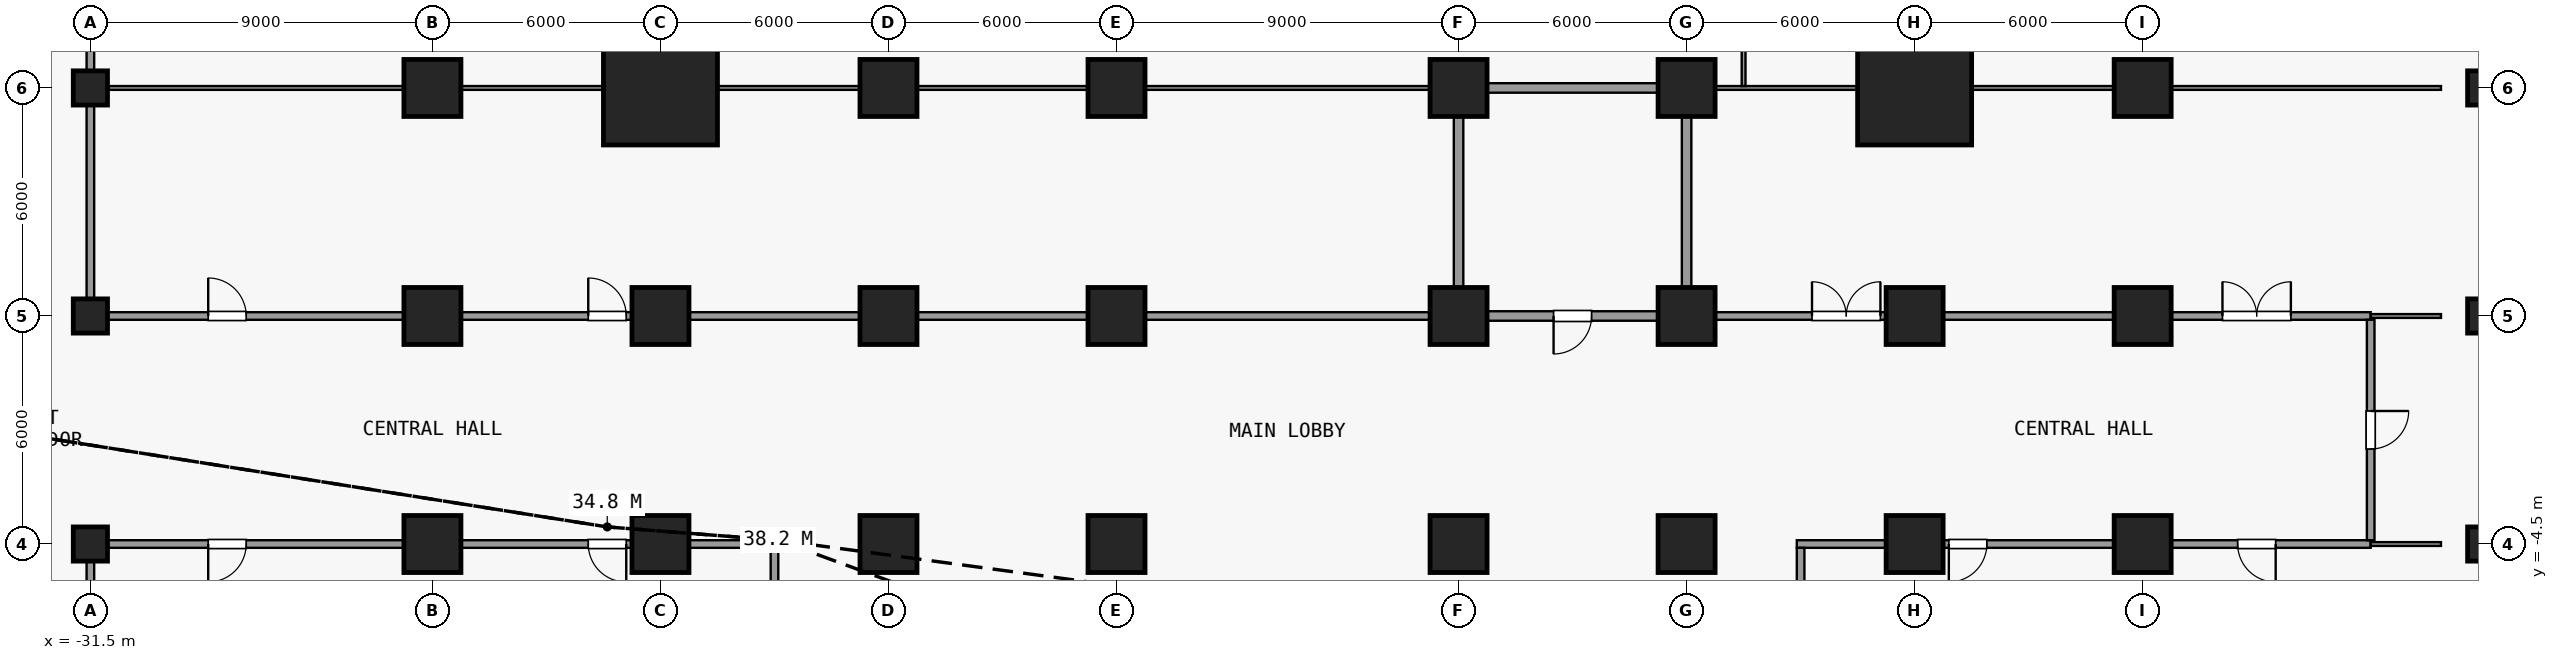
"""IFC4 building model, lengths in metres.
Left out: names, types, materials, properties, quantities, classifications, styles, units other than length and angle.
Written with IfcOpenShell. Run it as: python <this file> out.ifc"""

import sys

from ifc_helpers import new_model, si_unit, direction, frame, frame_2d, origin, origin_2d, place, context, subcontext, project, spatial, rectangle, extrude, element, fill, save


model = new_model("IFC4")
c1 = context("Model", 3, precision=1e-05, world=origin(), true_north=direction((0.0, 1.0)))
c2 = subcontext(c1, "Body", "Model", "MODEL_VIEW")
j1 = project(units=[si_unit("LENGTHUNIT", "METRE"), si_unit("PLANEANGLEUNIT", "RADIAN")], contexts=[c1])
p1 = place(None, origin())
s1 = spatial("IfcSite", under=j1, at=p1, CompositionType="ELEMENT")
p2 = place(p1, origin())
s2 = spatial("IfcBuilding", under=s1, at=p2, CompositionType="ELEMENT")
p3 = place(p2, origin())
s3 = spatial("IfcBuildingStorey", under=s2, at=p3, CompositionType="ELEMENT", Elevation=0.0)
for number, where, z_axis, x_axis in (
    (1, (-31.5, -4.5, 0.0), (0.0, 0.0, 1.0), (1.0, 0.0, 0.0)),
    (2, (-31.5, 1.5, 0.0), (0.0, 0.0, 1.0), (1.0, 0.0, 0.0)),
    (3, (-31.5, 7.5, 0.0), (0.0, 0.0, 1.0), (1.0, 0.0, 0.0)),
):
    element("IfcColumn", number, at=place(p3, frame(where, z_axis=z_axis, x_axis=x_axis)), inside=s3, PredefinedType="COLUMN", context=c2, shape_type="SweptSolid", body=[
        extrude(rectangle(XDim=0.9, YDim=0.9, at=origin_2d()), origin(), (0.0, 0.0, 1.0), 8.0),
    ])
for number, where, z_axis, x_axis in (
    (4, (-22.5, -4.5, 0.0), (0.0, 0.0, 1.0), (1.0, 0.0, 0.0)),
    (5, (-22.5, 1.5, 0.0), (0.0, 0.0, 1.0), (1.0, 0.0, 0.0)),
    (6, (-22.5, 7.5, 0.0), (0.0, 0.0, 1.0), (1.0, 0.0, 0.0)),
    (7, (-16.5, -4.5, 0.0), (0.0, 0.0, 1.0), (1.0, 0.0, 0.0)),
    (8, (-16.5, 1.5, 0.0), (0.0, 0.0, 1.0), (1.0, 0.0, 0.0)),
):
    element("IfcColumn", number, at=place(p3, frame(where, z_axis=z_axis, x_axis=x_axis)), inside=s3, PredefinedType="COLUMN", context=c2, shape_type="SweptSolid", body=[
        extrude(rectangle(XDim=1.5, YDim=1.5, at=origin_2d()), origin(), (0.0, 0.0, 1.0), 8.0),
    ])
p4 = place(p3, frame((-16.5, 7.5, 0.0), z_axis=(0.0, 0.0, 1.0), x_axis=(1.0, 0.0, 0.0)))
e9 = element("IfcColumn", 9, at=p4, inside=s3, PredefinedType="COLUMN", context=c2, shape_type="SweptSolid", body=[
    extrude(rectangle(XDim=3.0, YDim=3.0, at=origin_2d()), origin(), (0.0, 0.0, 1.0), 8.0),
])
for number, where, z_axis, x_axis in (
    (10, (-10.5, -4.5, 0.0), (0.0, 0.0, 1.0), (1.0, 0.0, 0.0)),
    (11, (-10.5, 1.5, 0.0), (0.0, 0.0, 1.0), (1.0, 0.0, 0.0)),
    (12, (-10.5, 7.5, 0.0), (0.0, 0.0, 1.0), (1.0, 0.0, 0.0)),
    (13, (-4.5, -4.5, 0.0), (0.0, 0.0, 1.0), (1.0, 0.0, 0.0)),
    (14, (-4.5, 1.5, 0.0), (0.0, 0.0, 1.0), (1.0, 0.0, 0.0)),
    (15, (-4.5, 7.5, 0.0), (0.0, 0.0, 1.0), (1.0, 0.0, 0.0)),
    (16, (4.5, -4.5, 0.0), (0.0, 0.0, 1.0), (1.0, 0.0, 0.0)),
    (17, (4.5, 1.5, 0.0), (0.0, 0.0, 1.0), (1.0, 0.0, 0.0)),
    (18, (4.5, 7.5, 0.0), (0.0, 0.0, 1.0), (1.0, 0.0, 0.0)),
    (19, (10.5, -4.5, 0.0), (0.0, 0.0, 1.0), (1.0, 0.0, 0.0)),
    (20, (10.5, 1.5, 0.0), (0.0, 0.0, 1.0), (1.0, 0.0, 0.0)),
    (21, (10.5, 7.5, 0.0), (0.0, 0.0, 1.0), (1.0, 0.0, 0.0)),
    (22, (16.5, -4.5, 0.0), (0.0, 0.0, 1.0), (1.0, 0.0, 0.0)),
    (23, (16.5, 1.5, 0.0), (0.0, 0.0, 1.0), (1.0, 0.0, 0.0)),
):
    element("IfcColumn", number, at=place(p3, frame(where, z_axis=z_axis, x_axis=x_axis)), inside=s3, PredefinedType="COLUMN", context=c2, shape_type="SweptSolid", body=[
        extrude(rectangle(XDim=1.5, YDim=1.5, at=origin_2d()), origin(), (0.0, 0.0, 1.0), 8.0),
    ])
p5 = place(p3, frame((16.5, 7.5, 0.0), z_axis=(0.0, 0.0, 1.0), x_axis=(1.0, 0.0, 0.0)))
e24 = element("IfcColumn", 24, at=p5, inside=s3, PredefinedType="COLUMN", context=c2, shape_type="SweptSolid", body=[
    extrude(rectangle(XDim=3.0, YDim=3.0, at=origin_2d()), origin(), (0.0, 0.0, 1.0), 8.0),
])
for number, where, z_axis, x_axis in (
    (25, (22.5, -4.5, 0.0), (0.0, 0.0, 1.0), (1.0, 0.0, 0.0)),
    (26, (22.5, 1.5, 0.0), (0.0, 0.0, 1.0), (1.0, 0.0, 0.0)),
    (27, (22.5, 7.5, 0.0), (0.0, 0.0, 1.0), (1.0, 0.0, 0.0)),
):
    element("IfcColumn", number, at=place(p3, frame(where, z_axis=z_axis, x_axis=x_axis)), inside=s3, PredefinedType="COLUMN", context=c2, shape_type="SweptSolid", body=[
        extrude(rectangle(XDim=1.5, YDim=1.5, at=origin_2d()), origin(), (0.0, 0.0, 1.0), 8.0),
    ])
for number, where, z_axis, x_axis in (
    (28, (31.5, -4.5, 0.0), (0.0, 0.0, 1.0), (1.0, 0.0, 0.0)),
    (29, (31.5, 1.5, 0.0), (0.0, 0.0, 1.0), (1.0, 0.0, 0.0)),
    (30, (31.5, 7.5, 0.0), (0.0, 0.0, 1.0), (1.0, 0.0, 0.0)),
):
    element("IfcColumn", number, at=place(p3, frame(where, z_axis=z_axis, x_axis=x_axis)), inside=s3, PredefinedType="COLUMN", context=c2, shape_type="SweptSolid", body=[
        extrude(rectangle(XDim=0.9, YDim=0.9, at=origin_2d()), origin(), (0.0, 0.0, 1.0), 8.0),
    ])
p6 = place(p3, frame((-31.6, -4.5, 0.0), z_axis=(0.0, 0.0, 1.0), x_axis=(1.0, 0.0, 0.0)))
e31 = element("IfcWall", 31, at=p6, inside=s3, PredefinedType="PARTITIONING", context=c2, shape_type="SweptSolid", body=[
    extrude(rectangle(XDim=18.2, YDim=0.2, at=frame_2d((9.1, 0.0))), origin(), (0.0, 0.0, 1.0), 7.65),
])
p7 = place(p6, frame((3.2, 0.0, 0.0)))
e32 = element("IfcOpeningElement", 32, at=p7, cuts=e31, PredefinedType="OPENING", context=c2, shape_type="SweptSolid", body=[
    extrude(rectangle(XDim=1.0, YDim=2.1, at=frame_2d((0.5, 1.05))), frame((0.0, 0.11, 0.0), z_axis=(0.0, -1.0, 0.0), x_axis=(1.0, 0.0, 0.0)), (0.0, 0.0, 1.0), 0.22),
])
p8 = place(p6, frame((13.2, 0.0, 0.0)))
e33 = element("IfcOpeningElement", 33, at=p8, cuts=e31, PredefinedType="OPENING", context=c2, shape_type="SweptSolid", body=[
    extrude(rectangle(XDim=1.0, YDim=2.1, at=frame_2d((0.5, 1.05))), frame((0.0, 0.11, 0.0), z_axis=(0.0, -1.0, 0.0), x_axis=(1.0, 0.0, 0.0)), (0.0, 0.0, 1.0), 0.22),
])
p9 = place(p3, frame((13.4, -4.5, 0.0), z_axis=(0.0, 0.0, 1.0), x_axis=(1.0, 0.0, 0.0)))
e34 = element("IfcWall", 34, at=p9, inside=s3, PredefinedType="PARTITIONING", context=c2, shape_type="SweptSolid", body=[
    extrude(rectangle(XDim=15.1, YDim=0.2, at=frame_2d((7.55, 0.0))), origin(), (0.0, 0.0, 1.0), 7.65),
])
p10 = place(p9, frame((4.0, 0.0, 0.0)))
e35 = element("IfcOpeningElement", 35, at=p10, cuts=e34, PredefinedType="OPENING", context=c2, shape_type="SweptSolid", body=[
    extrude(rectangle(XDim=1.0, YDim=2.1, at=frame_2d((0.5, 1.05))), frame((0.0, 0.11, 0.0), z_axis=(0.0, -1.0, 0.0), x_axis=(1.0, 0.0, 0.0)), (0.0, 0.0, 1.0), 0.22),
])
p11 = place(p9, frame((11.6, 0.0, 0.0)))
e36 = element("IfcOpeningElement", 36, at=p11, cuts=e34, PredefinedType="OPENING", context=c2, shape_type="SweptSolid", body=[
    extrude(rectangle(XDim=1.0, YDim=2.1, at=frame_2d((0.5, 1.05))), frame((0.0, 0.11, 0.0), z_axis=(0.0, -1.0, 0.0), x_axis=(1.0, 0.0, 0.0)), (0.0, 0.0, 1.0), 0.22),
])
p12 = place(p3, frame((28.5, -4.5, 0.0), z_axis=(0.0, 0.0, 1.0), x_axis=(1.0, 0.0, 0.0)))
e37 = element("IfcWall", 37, at=p12, inside=s3, PredefinedType="PARTITIONING", context=c2, shape_type="SweptSolid", body=[
    extrude(rectangle(XDim=1.85, YDim=0.1, at=frame_2d((0.925, 0.0))), origin(), (0.0, 0.0, 1.0), 7.65),
])
p13 = place(p3, frame((-31.6, 1.5, 0.0), z_axis=(0.0, 0.0, 1.0), x_axis=(1.0, 0.0, 0.0)))
e38 = element("IfcWall", 38, at=p13, inside=s3, PredefinedType="PARTITIONING", context=c2, shape_type="SweptSolid", body=[
    extrude(rectangle(XDim=36.1, YDim=0.2, at=frame_2d((18.05, 0.0))), origin(), (0.0, 0.0, 1.0), 7.65),
])
p14 = place(p13, frame((3.2, 0.0, 0.0)))
e39 = element("IfcOpeningElement", 39, at=p14, cuts=e38, PredefinedType="OPENING", context=c2, shape_type="SweptSolid", body=[
    extrude(rectangle(XDim=1.0, YDim=2.1, at=frame_2d((0.5, 1.05))), frame((0.0, 0.11, 0.0), z_axis=(0.0, -1.0, 0.0), x_axis=(1.0, 0.0, 0.0)), (0.0, 0.0, 1.0), 0.22),
])
p15 = place(p13, frame((13.2, 0.0, 0.0)))
e40 = element("IfcOpeningElement", 40, at=p15, cuts=e38, PredefinedType="OPENING", context=c2, shape_type="SweptSolid", body=[
    extrude(rectangle(XDim=1.0, YDim=2.1, at=frame_2d((0.5, 1.05))), frame((0.0, 0.11, 0.0), z_axis=(0.0, -1.0, 0.0), x_axis=(1.0, 0.0, 0.0)), (0.0, 0.0, 1.0), 0.22),
])
p16 = place(p3, frame((10.5, 1.5, 0.0), z_axis=(0.0, 0.0, 1.0), x_axis=(1.0, 0.0, 0.0)))
e41 = element("IfcWall", 41, at=p16, inside=s3, PredefinedType="PARTITIONING", context=c2, shape_type="SweptSolid", body=[
    extrude(rectangle(XDim=18.0, YDim=0.2, at=frame_2d((9.0, 0.0))), origin(), (0.0, 0.0, 1.0), 7.65),
])
p17 = place(p16, frame((3.3, 0.0, 0.0)))
e42 = element("IfcOpeningElement", 42, at=p17, cuts=e41, PredefinedType="OPENING", context=c2, shape_type="SweptSolid", body=[
    extrude(rectangle(XDim=1.8, YDim=2.1, at=frame_2d((0.9, 1.05))), frame((0.0, 0.11, 0.0), z_axis=(0.0, -1.0, 0.0), x_axis=(1.0, 0.0, 0.0)), (0.0, 0.0, 1.0), 0.22),
])
p18 = place(p16, frame((14.1, 0.0, 0.0)))
e43 = element("IfcOpeningElement", 43, at=p18, cuts=e41, PredefinedType="OPENING", context=c2, shape_type="SweptSolid", body=[
    extrude(rectangle(XDim=1.8, YDim=2.1, at=frame_2d((0.9, 1.05))), frame((0.0, 0.11, 0.0), z_axis=(0.0, -1.0, 0.0), x_axis=(1.0, 0.0, 0.0)), (0.0, 0.0, 1.0), 0.22),
])
p19 = place(p3, frame((28.5, 1.5, 0.0), z_axis=(0.0, 0.0, 1.0), x_axis=(1.0, 0.0, 0.0)))
e44 = element("IfcWall", 44, at=p19, inside=s3, PredefinedType="PARTITIONING", context=c2, shape_type="SweptSolid", body=[
    extrude(rectangle(XDim=1.85, YDim=0.1, at=frame_2d((0.925, 0.0))), origin(), (0.0, 0.0, 1.0), 7.65),
])
p20 = place(p3, frame((4.5, 1.5, 0.0), z_axis=(0.0, 0.0, 1.0), x_axis=(1.0, 0.0, 0.0)))
e45 = element("IfcWall", 45, at=p20, inside=s3, PredefinedType="PARTITIONING", context=c2, shape_type="SweptSolid", body=[
    extrude(rectangle(XDim=6.0, YDim=0.25, at=frame_2d((3.0, 0.0))), origin(), (0.0, 0.0, 1.0), 7.65),
])
p21 = place(p20, frame((2.5, 0.0, 0.0)))
e46 = element("IfcOpeningElement", 46, at=p21, cuts=e45, PredefinedType="OPENING", context=c2, shape_type="SweptSolid", body=[
    extrude(rectangle(XDim=1.0, YDim=2.1, at=frame_2d((0.5, 1.05))), frame((0.0, 0.135, 0.0), z_axis=(0.0, -1.0, 0.0), x_axis=(1.0, 0.0, 0.0)), (0.0, 0.0, 1.0), 0.27),
])
p22 = place(p3, frame((-31.4, 7.5, 0.0), z_axis=(0.0, 0.0, 1.0), x_axis=(1.0, 0.0, 0.0)))
e47 = element("IfcWall", 47, at=p22, inside=s3, PredefinedType="PARTITIONING", context=c2, shape_type="SweptSolid", body=[
    extrude(rectangle(XDim=35.9, YDim=0.1, at=frame_2d((17.95, 0.0))), origin(), (0.0, 0.0, 1.0), 7.65),
])
p23 = place(p3, frame((10.5, 7.5, 0.0), z_axis=(0.0, 0.0, 1.0), x_axis=(1.0, 0.0, 0.0)))
e48 = element("IfcWall", 48, at=p23, inside=s3, PredefinedType="PARTITIONING", context=c2, shape_type="SweptSolid", body=[
    extrude(rectangle(XDim=19.85, YDim=0.1, at=frame_2d((9.925, 0.0))), origin(), (0.0, 0.0, 1.0), 7.65),
])
p24 = place(p3, frame((4.5, 7.5, 0.0), z_axis=(0.0, 0.0, 1.0), x_axis=(1.0, 0.0, 0.0)))
e49 = element("IfcWall", 49, at=p24, inside=s3, PredefinedType="PARTITIONING", context=c2, shape_type="SweptSolid", body=[
    extrude(rectangle(XDim=6.0, YDim=0.25, at=frame_2d((3.0, 0.0))), origin(), (0.0, 0.0, 1.0), 7.65),
])
p25 = place(p3, frame((-31.5, -19.4, 0.0), z_axis=(0.0, 0.0, 1.0), x_axis=(0.0, 1.0, 0.0)))
e50 = element("IfcWall", 50, at=p25, inside=s3, PredefinedType="PARTITIONING", context=c2, shape_type="SweptSolid", body=[
    extrude(rectangle(XDim=14.8, YDim=0.2, at=frame_2d((7.4, 0.0))), origin(), (0.0, 0.0, 1.0), 7.65),
])
p26 = place(p3, frame((-31.5, 1.6, 0.0), z_axis=(0.0, 0.0, 1.0), x_axis=(0.0, 1.0, 0.0)))
e51 = element("IfcWall", 51, at=p26, inside=s3, PredefinedType="PARTITIONING", context=c2, shape_type="SweptSolid", body=[
    extrude(rectangle(XDim=11.8, YDim=0.2, at=frame_2d((5.9, 0.0))), origin(), (0.0, 0.0, 1.0), 7.65),
])
p27 = place(p3, frame((-13.5, -7.9, 0.0), z_axis=(0.0, 0.0, 1.0), x_axis=(0.0, 1.0, 0.0)))
e52 = element("IfcWall", 52, at=p27, inside=s3, PredefinedType="PARTITIONING", context=c2, shape_type="SweptSolid", body=[
    extrude(rectangle(XDim=3.3, YDim=0.2, at=frame_2d((1.65, 0.0))), origin(), (0.0, 0.0, 1.0), 7.65),
])
for number, where, z_axis, x_axis in (
    (53, (4.5, 1.625, 0.0), (0.0, 0.0, 1.0), (0.0, 1.0, 0.0)),
    (54, (10.5, 1.625, 0.0), (0.0, 0.0, 1.0), (0.0, 1.0, 0.0)),
):
    element("IfcWall", number, at=place(p3, frame(where, z_axis=z_axis, x_axis=x_axis)), inside=s3, PredefinedType="PARTITIONING", context=c2, shape_type="SweptSolid", body=[
        extrude(rectangle(XDim=5.75, YDim=0.25, at=frame_2d((2.875, 0.0))), origin(), (0.0, 0.0, 1.0), 7.65),
    ])
p28 = place(p3, frame((12.0, 7.55, 0.0), z_axis=(0.0, 0.0, 1.0), x_axis=(0.0, 1.0, 0.0)))
e55 = element("IfcWall", 55, at=p28, inside=s3, PredefinedType="PARTITIONING", context=c2, shape_type="SweptSolid", body=[
    extrude(rectangle(XDim=5.85, YDim=0.1, at=frame_2d((2.925, 0.0))), origin(), (0.0, 0.0, 1.0), 7.65),
])
p29 = place(p3, frame((13.5, -5.6, 0.0), z_axis=(0.0, 0.0, 1.0), x_axis=(0.0, 1.0, 0.0)))
e56 = element("IfcWall", 56, at=p29, inside=s3, PredefinedType="PARTITIONING", context=c2, shape_type="SweptSolid", body=[
    extrude(rectangle(XDim=1.0, YDim=0.2, at=frame_2d((0.5, 0.0))), origin(), (0.0, 0.0, 1.0), 7.65),
])
p30 = place(p3, frame((28.5, -4.4, 0.0), z_axis=(0.0, 0.0, 1.0), x_axis=(0.0, 1.0, 0.0)))
e57 = element("IfcWall", 57, at=p30, inside=s3, PredefinedType="PARTITIONING", context=c2, shape_type="SweptSolid", body=[
    extrude(rectangle(XDim=5.8, YDim=0.2, at=frame_2d((2.9, 0.0))), origin(), (0.0, 0.0, 1.0), 7.65),
])
p31 = place(p30, frame((2.4, 0.0, 0.0)))
e58 = element("IfcOpeningElement", 58, at=p31, cuts=e57, PredefinedType="OPENING", context=c2, shape_type="SweptSolid", body=[
    extrude(rectangle(XDim=1.0, YDim=2.1, at=frame_2d((0.5, 1.05))), frame((0.0, 0.11, 0.0), z_axis=(0.0, -1.0, 0.0), x_axis=(1.0, 0.0, 0.0)), (0.0, 0.0, 1.0), 0.22),
])
p32 = place(p7, origin())
e59 = element("IfcDoor", 59, at=p32, inside=s3, OperationType="SINGLE_SWING_LEFT", PredefinedType="DOOR", context=c2, shape_type="SweptSolid", body=[
    extrude(rectangle(XDim=1.0, YDim=2.1, at=frame_2d((0.5, 1.05))), frame((0.0, 0.025, 0.0), z_axis=(0.0, -1.0, 0.0), x_axis=(1.0, 0.0, 0.0)), (0.0, 0.0, 1.0), 0.05),
])
fill(e32, e59)
p33 = place(p8, origin())
e60 = element("IfcDoor", 60, at=p33, inside=s3, OperationType="SINGLE_SWING_RIGHT", PredefinedType="DOOR", context=c2, shape_type="SweptSolid", body=[
    extrude(rectangle(XDim=1.0, YDim=2.1, at=frame_2d((0.5, 1.05))), frame((0.0, 0.025, 0.0), z_axis=(0.0, -1.0, 0.0), x_axis=(1.0, 0.0, 0.0)), (0.0, 0.0, 1.0), 0.05),
])
fill(e33, e60)
p34 = place(p10, origin())
e61 = element("IfcDoor", 61, at=p34, inside=s3, OperationType="SINGLE_SWING_LEFT", PredefinedType="DOOR", context=c2, shape_type="SweptSolid", body=[
    extrude(rectangle(XDim=1.0, YDim=2.1, at=frame_2d((0.5, 1.05))), frame((0.0, 0.025, 0.0), z_axis=(0.0, -1.0, 0.0), x_axis=(1.0, 0.0, 0.0)), (0.0, 0.0, 1.0), 0.05),
])
fill(e35, e61)
p35 = place(p11, origin())
e62 = element("IfcDoor", 62, at=p35, inside=s3, OperationType="SINGLE_SWING_RIGHT", PredefinedType="DOOR", context=c2, shape_type="SweptSolid", body=[
    extrude(rectangle(XDim=1.0, YDim=2.1, at=frame_2d((0.5, 1.05))), frame((0.0, 0.025, 0.0), z_axis=(0.0, -1.0, 0.0), x_axis=(1.0, 0.0, 0.0)), (0.0, 0.0, 1.0), 0.05),
])
fill(e36, e62)
p36 = place(p14, origin())
e63 = element("IfcDoor", 63, at=p36, inside=s3, OperationType="SINGLE_SWING_RIGHT", PredefinedType="DOOR", context=c2, shape_type="SweptSolid", body=[
    extrude(rectangle(XDim=1.0, YDim=2.1, at=frame_2d((0.5, 1.05))), frame((0.0, 0.025, 0.0), z_axis=(0.0, -1.0, 0.0), x_axis=(1.0, 0.0, 0.0)), (0.0, 0.0, 1.0), 0.05),
])
fill(e39, e63)
p37 = place(p15, origin())
e64 = element("IfcDoor", 64, at=p37, inside=s3, OperationType="SINGLE_SWING_RIGHT", PredefinedType="DOOR", context=c2, shape_type="SweptSolid", body=[
    extrude(rectangle(XDim=1.0, YDim=2.1, at=frame_2d((0.5, 1.05))), frame((0.0, 0.025, 0.0), z_axis=(0.0, -1.0, 0.0), x_axis=(1.0, 0.0, 0.0)), (0.0, 0.0, 1.0), 0.05),
])
fill(e40, e64)
p38 = place(p17, origin())
e65 = element("IfcDoor", 65, at=p38, inside=s3, OperationType="DOUBLE_DOOR_SINGLE_SWING", PredefinedType="DOOR", context=c2, shape_type="SweptSolid", body=[
    extrude(rectangle(XDim=1.8, YDim=2.1, at=frame_2d((0.9, 1.05))), frame((0.0, 0.025, 0.0), z_axis=(0.0, -1.0, 0.0), x_axis=(1.0, 0.0, 0.0)), (0.0, 0.0, 1.0), 0.05),
])
fill(e42, e65)
p39 = place(p18, origin())
e66 = element("IfcDoor", 66, at=p39, inside=s3, OperationType="DOUBLE_DOOR_SINGLE_SWING", PredefinedType="DOOR", context=c2, shape_type="SweptSolid", body=[
    extrude(rectangle(XDim=1.8, YDim=2.1, at=frame_2d((0.9, 1.05))), frame((0.0, 0.025, 0.0), z_axis=(0.0, -1.0, 0.0), x_axis=(1.0, 0.0, 0.0)), (0.0, 0.0, 1.0), 0.05),
])
fill(e43, e66)
p40 = place(p21, origin())
e67 = element("IfcDoor", 67, at=p40, inside=s3, OperationType="SINGLE_SWING_LEFT", PredefinedType="DOOR", context=c2, shape_type="SweptSolid", body=[
    extrude(rectangle(XDim=1.0, YDim=2.1, at=frame_2d((0.5, 1.05))), frame((0.0, 0.025, 0.0), z_axis=(0.0, -1.0, 0.0), x_axis=(1.0, 0.0, 0.0)), (0.0, 0.0, 1.0), 0.05),
])
fill(e46, e67)
p41 = place(p31, origin())
e68 = element("IfcDoor", 68, at=p41, inside=s3, OperationType="SINGLE_SWING_RIGHT", PredefinedType="DOOR", context=c2, shape_type="SweptSolid", body=[
    extrude(rectangle(XDim=1.0, YDim=2.1, at=frame_2d((0.5, 1.05))), frame((0.0, 0.025, 0.0), z_axis=(0.0, -1.0, 0.0), x_axis=(1.0, 0.0, 0.0)), (0.0, 0.0, 1.0), 0.05),
])
fill(e58, e68)
save(model, sys.argv[1])
